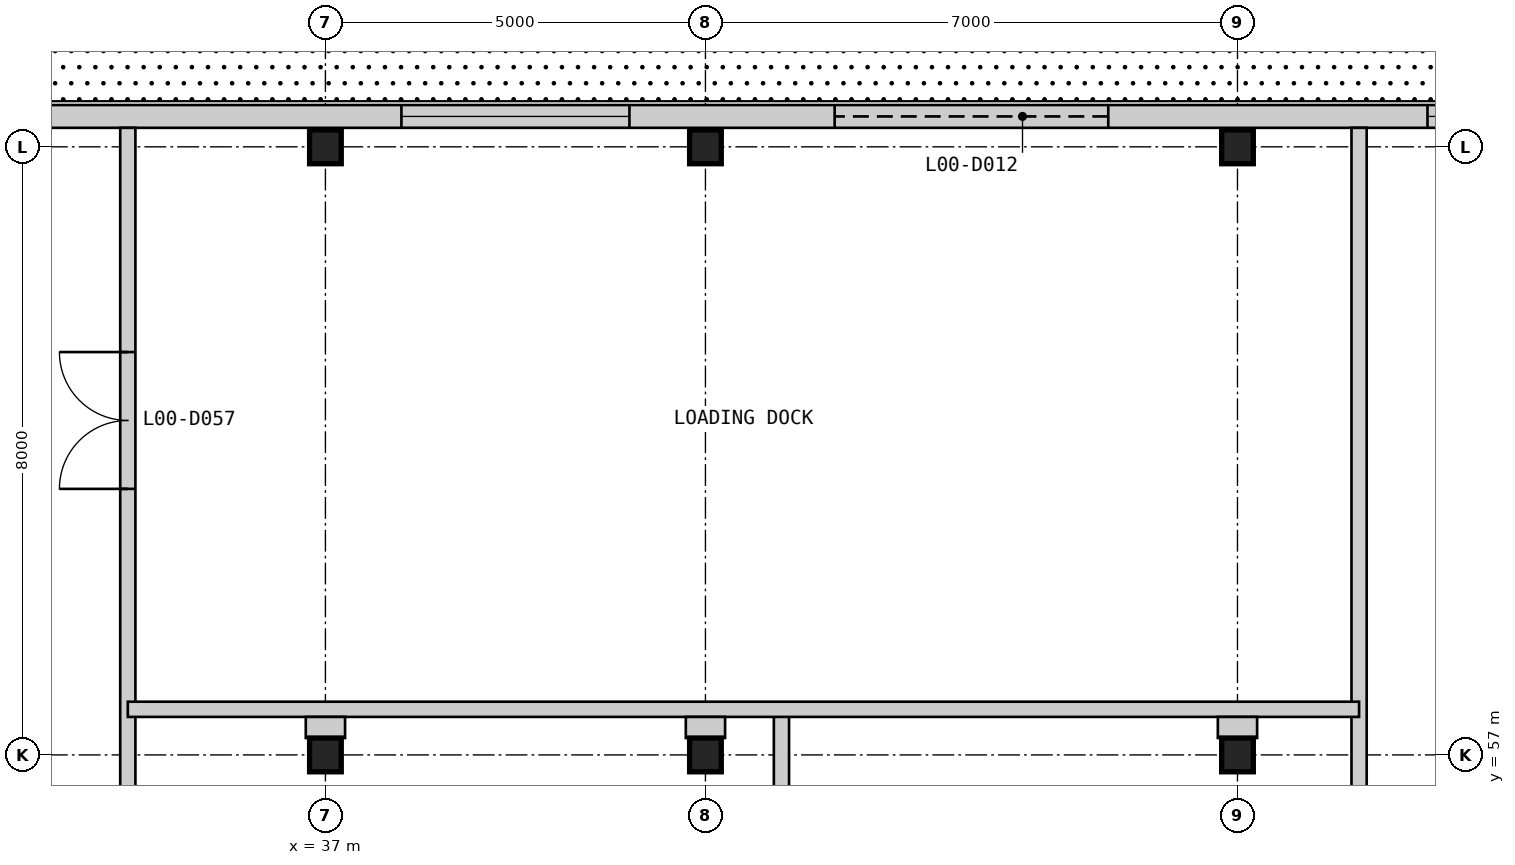
"""IFC4 building model, lengths in metres.
Left out: names, types, materials, properties, quantities, classifications, styles, units other than length and angle.
Written with IfcOpenShell. Run it as: python <this file> out.ifc"""

import sys

from ifc_helpers import new_model, si_unit, direction, frame, frame_2d, origin, origin_2d, place, context, subcontext, project, spatial, rectangle, i_section, extrude, element, fill, save


model = new_model("IFC4")
c1 = context("Model", 3, precision=1e-05, world=origin(), true_north=direction((0.0, 1.0)))
c2 = subcontext(c1, "Body", "Model", "MODEL_VIEW")
j1 = project(units=[si_unit("LENGTHUNIT", "METRE"), si_unit("PLANEANGLEUNIT", "RADIAN")], contexts=[c1])
p1 = place(None, origin())
s1 = spatial("IfcSite", under=j1, at=p1, CompositionType="ELEMENT")
p2 = place(p1, origin())
s2 = spatial("IfcBuilding", under=s1, at=p2, CompositionType="ELEMENT")
p3 = place(p2, origin())
s3 = spatial("IfcBuildingStorey", under=s2, at=p3, CompositionType="ELEMENT", Elevation=0.0)
p4 = place(p3, frame((37.0, 57.0, 0.0), z_axis=(0.0, 0.0, 1.0), x_axis=(1.0, 0.0, 0.0)))
e1 = element("IfcColumn", 1, at=p4, inside=s3, PredefinedType="COLUMN", context=c2, shape_type="SweptSolid", body=[
    extrude(i_section(OverallWidth=0.417, OverallDepth=0.445, WebThickness=0.039, FlangeThickness=0.063, at=origin_2d()), origin(), (0.0, 0.0, 1.0), 7.0),
])
p5 = place(p3, frame((37.0, 65.0, -0.3), z_axis=(0.0, 0.0, 1.0), x_axis=(1.0, 0.0, 0.0)))
e2 = element("IfcColumn", 2, at=p5, inside=s3, PredefinedType="COLUMN", context=c2, shape_type="SweptSolid", body=[
    extrude(i_section(OverallWidth=0.417, OverallDepth=0.445, WebThickness=0.039, FlangeThickness=0.063, at=origin_2d()), origin(), (0.0, 0.0, 1.0), 7.3),
])
p6 = place(p3, frame((42.0, 57.0, 0.0), z_axis=(0.0, 0.0, 1.0), x_axis=(1.0, 0.0, 0.0)))
e3 = element("IfcColumn", 3, at=p6, inside=s3, PredefinedType="COLUMN", context=c2, shape_type="SweptSolid", body=[
    extrude(i_section(OverallWidth=0.417, OverallDepth=0.445, WebThickness=0.039, FlangeThickness=0.063, at=origin_2d()), origin(), (0.0, 0.0, 1.0), 7.0),
])
p7 = place(p3, frame((42.0, 65.0, -0.3), z_axis=(0.0, 0.0, 1.0), x_axis=(1.0, 0.0, 0.0)))
e4 = element("IfcColumn", 4, at=p7, inside=s3, PredefinedType="COLUMN", context=c2, shape_type="SweptSolid", body=[
    extrude(i_section(OverallWidth=0.417, OverallDepth=0.445, WebThickness=0.039, FlangeThickness=0.063, at=origin_2d()), origin(), (0.0, 0.0, 1.0), 7.3),
])
p8 = place(p3, frame((49.0, 57.0, 0.0), z_axis=(0.0, 0.0, 1.0), x_axis=(1.0, 0.0, 0.0)))
e5 = element("IfcColumn", 5, at=p8, inside=s3, PredefinedType="COLUMN", context=c2, shape_type="SweptSolid", body=[
    extrude(i_section(OverallWidth=0.417, OverallDepth=0.445, WebThickness=0.039, FlangeThickness=0.063, at=origin_2d()), origin(), (0.0, 0.0, 1.0), 7.0),
])
p9 = place(p3, frame((49.0, 65.0, -0.3), z_axis=(0.0, 0.0, 1.0), x_axis=(1.0, 0.0, 0.0)))
e6 = element("IfcColumn", 6, at=p9, inside=s3, PredefinedType="COLUMN", context=c2, shape_type="SweptSolid", body=[
    extrude(i_section(OverallWidth=0.417, OverallDepth=0.445, WebThickness=0.039, FlangeThickness=0.063, at=origin_2d()), origin(), (0.0, 0.0, 1.0), 7.3),
])
p10 = place(p3, frame((65.55, 65.4, 0.0), z_axis=(0.0, 0.0, 1.0), x_axis=(-1.0, 0.0, 0.0)))
e7 = element("IfcWall", 7, at=p10, inside=s3, PredefinedType="SOLIDWALL", context=c2, shape_type="SweptSolid", body=[
    extrude(rectangle(XDim=81.1, YDim=0.3, at=frame_2d((40.55, 0.0))), origin(), (0.0, 0.0, 1.0), 6.7),
])
p11 = place(p10, frame((37.65, 0.0, 0.0)))
e8 = element("IfcOpeningElement", 8, at=p11, cuts=e7, PredefinedType="OPENING", context=c2, shape_type="SweptSolid", body=[
    extrude(rectangle(XDim=1.8, YDim=2.4, at=frame_2d((0.9, 1.2))), frame((0.0, 0.16, 0.0), z_axis=(0.0, -1.0, 0.0), x_axis=(1.0, 0.0, 0.0)), (0.0, 0.0, 1.0), 0.32),
])
p12 = place(p10, frame((33.65, 0.0, 0.0)))
e9 = element("IfcOpeningElement", 9, at=p12, cuts=e7, PredefinedType="OPENING", context=c2, shape_type="SweptSolid", body=[
    extrude(rectangle(XDim=1.8, YDim=2.4, at=frame_2d((0.9, 1.2))), frame((0.0, 0.16, 0.0), z_axis=(0.0, -1.0, 0.0), x_axis=(1.0, 0.0, 0.0)), (0.0, 0.0, 1.0), 0.32),
])
p13 = place(p10, frame((18.25, 0.0, 0.0)))
e10 = element("IfcOpeningElement", 10, at=p13, cuts=e7, PredefinedType="OPENING", context=c2, shape_type="SweptSolid", body=[
    extrude(rectangle(XDim=3.6, YDim=4.5, at=frame_2d((1.8, 2.25))), frame((0.0, 0.16, 0.0), z_axis=(0.0, -1.0, 0.0), x_axis=(1.0, 0.0, 0.0)), (0.0, 0.0, 1.0), 0.32),
])
p14 = place(p10, frame((75.05, 0.0, 0.9)))
e11 = element("IfcOpeningElement", 11, at=p14, cuts=e7, PredefinedType="OPENING", context=c2, shape_type="SweptSolid", body=[
    extrude(rectangle(XDim=3.0, YDim=2.4, at=frame_2d((1.5, 1.2))), frame((0.0, 0.16, 0.0), z_axis=(0.0, -1.0, 0.0), x_axis=(1.0, 0.0, 0.0)), (0.0, 0.0, 1.0), 0.32),
])
p15 = place(p10, frame((67.05, 0.0, 0.9)))
e12 = element("IfcOpeningElement", 12, at=p15, cuts=e7, PredefinedType="OPENING", context=c2, shape_type="SweptSolid", body=[
    extrude(rectangle(XDim=3.0, YDim=2.4, at=frame_2d((1.5, 1.2))), frame((0.0, 0.16, 0.0), z_axis=(0.0, -1.0, 0.0), x_axis=(1.0, 0.0, 0.0)), (0.0, 0.0, 1.0), 0.32),
])
p16 = place(p10, frame((59.05, 0.0, 0.9)))
e13 = element("IfcOpeningElement", 13, at=p16, cuts=e7, PredefinedType="OPENING", context=c2, shape_type="SweptSolid", body=[
    extrude(rectangle(XDim=3.0, YDim=2.4, at=frame_2d((1.5, 1.2))), frame((0.0, 0.16, 0.0), z_axis=(0.0, -1.0, 0.0), x_axis=(1.0, 0.0, 0.0)), (0.0, 0.0, 1.0), 0.32),
])
p17 = place(p10, frame((45.05, 0.0, 0.9)))
e14 = element("IfcOpeningElement", 14, at=p17, cuts=e7, PredefinedType="OPENING", context=c2, shape_type="SweptSolid", body=[
    extrude(rectangle(XDim=3.0, YDim=2.4, at=frame_2d((1.5, 1.2))), frame((0.0, 0.16, 0.0), z_axis=(0.0, -1.0, 0.0), x_axis=(1.0, 0.0, 0.0)), (0.0, 0.0, 1.0), 0.32),
])
p18 = place(p10, frame((24.55, 0.0, 0.9)))
e15 = element("IfcOpeningElement", 15, at=p18, cuts=e7, PredefinedType="OPENING", context=c2, shape_type="SweptSolid", body=[
    extrude(rectangle(XDim=3.0, YDim=2.4, at=frame_2d((1.5, 1.2))), frame((0.0, 0.16, 0.0), z_axis=(0.0, -1.0, 0.0), x_axis=(1.0, 0.0, 0.0)), (0.0, 0.0, 1.0), 0.32),
])
p19 = place(p10, frame((11.05, 0.0, 0.9)))
e16 = element("IfcOpeningElement", 16, at=p19, cuts=e7, PredefinedType="OPENING", context=c2, shape_type="SweptSolid", body=[
    extrude(rectangle(XDim=3.0, YDim=2.4, at=frame_2d((1.5, 1.2))), frame((0.0, 0.16, 0.0), z_axis=(0.0, -1.0, 0.0), x_axis=(1.0, 0.0, 0.0)), (0.0, 0.0, 1.0), 0.32),
])
p20 = place(p10, frame((3.05, 0.0, 0.9)))
e17 = element("IfcOpeningElement", 17, at=p20, cuts=e7, PredefinedType="OPENING", context=c2, shape_type="SweptSolid", body=[
    extrude(rectangle(XDim=3.0, YDim=2.4, at=frame_2d((1.5, 1.2))), frame((0.0, 0.16, 0.0), z_axis=(0.0, -1.0, 0.0), x_axis=(1.0, 0.0, 0.0)), (0.0, 0.0, 1.0), 0.32),
])
p21 = place(p3, frame((34.4, 43.0, 0.0), z_axis=(0.0, 0.0, 1.0), x_axis=(0.0, 1.0, 0.0)))
e18 = element("IfcWall", 18, at=p21, inside=s3, PredefinedType="PARTITIONING", context=c2, shape_type="SweptSolid", body=[
    extrude(rectangle(XDim=22.25, YDim=0.2, at=frame_2d((11.125, 0.0))), origin(), (0.0, 0.0, 1.0), 6.7),
])
p22 = place(p21, frame((6.425, 0.0, 0.0)))
e19 = element("IfcOpeningElement", 19, at=p22, cuts=e18, PredefinedType="OPENING", context=c2, shape_type="SweptSolid", body=[
    extrude(rectangle(XDim=1.8, YDim=2.4, at=frame_2d((0.9, 1.2))), frame((0.0, 0.11, 0.0), z_axis=(0.0, -1.0, 0.0), x_axis=(1.0, 0.0, 0.0)), (0.0, 0.0, 1.0), 0.22),
])
p23 = place(p21, frame((17.5, 0.0, 0.0)))
e20 = element("IfcOpeningElement", 20, at=p23, cuts=e18, PredefinedType="OPENING", context=c2, shape_type="SweptSolid", body=[
    extrude(rectangle(XDim=1.8, YDim=2.4, at=frame_2d((0.9, 1.2))), frame((0.0, 0.11, 0.0), z_axis=(0.0, -1.0, 0.0), x_axis=(1.0, 0.0, 0.0)), (0.0, 0.0, 1.0), 0.22),
])
p24 = place(p3, frame((43.0, 37.0, 0.0), z_axis=(0.0, 0.0, 1.0), x_axis=(0.0, 1.0, 0.0)))
e21 = element("IfcWall", 21, at=p24, inside=s3, PredefinedType="PARTITIONING", context=c2, shape_type="SweptSolid", body=[
    extrude(rectangle(XDim=20.6, YDim=0.2, at=frame_2d((10.3, 0.0))), origin(), (0.0, 0.0, 1.0), 6.7),
])
p25 = place(p3, frame((50.6, 38.4, 0.0), z_axis=(0.0, 0.0, 1.0), x_axis=(0.0, 1.0, 0.0)))
e22 = element("IfcWall", 22, at=p25, inside=s3, PredefinedType="PARTITIONING", context=c2, shape_type="SweptSolid", body=[
    extrude(rectangle(XDim=26.85, YDim=0.2, at=frame_2d((13.425, 0.0))), origin(), (0.0, 0.0, 1.0), 6.7),
])
p26 = place(p3, frame((34.4, 57.6, 0.0), z_axis=(0.0, 0.0, 1.0), x_axis=(1.0, 0.0, 0.0)))
e23 = element("IfcWall", 23, at=p26, inside=s3, PredefinedType="PARTITIONING", context=c2, shape_type="SweptSolid", body=[
    extrude(rectangle(XDim=16.2, YDim=0.2, at=frame_2d((8.1, 0.0))), origin(), (0.0, 0.0, 1.0), 6.7),
])
for number, where, z_axis, x_axis in (
    (24, (49.0, 57.5, 0.0), (0.0, 0.0, 1.0), (0.0, -1.0, 0.0)),
    (25, (37.0, 57.5, 0.0), (0.0, 0.0, 1.0), (0.0, -1.0, 0.0)),
    (26, (42.0, 57.5, 0.0), (0.0, 0.0, 1.0), (0.0, -1.0, 0.0)),
):
    element("IfcWall", number, at=place(p3, frame(where, z_axis=z_axis, x_axis=x_axis)), inside=s3, PredefinedType="PARTITIONING", context=c2, shape_type="SweptSolid", body=[
        extrude(rectangle(XDim=0.278, YDim=0.517, at=frame_2d((0.139, 0.0))), origin(), (0.0, 0.0, 1.0), 6.7),
    ])
p27 = place(p13, origin())
e27 = element("IfcDoor", 27, at=p27, inside=s3, OperationType="ROLLINGUP", PredefinedType="DOOR", context=c2, shape_type="SweptSolid", body=[
    extrude(rectangle(XDim=3.6, YDim=4.5, at=frame_2d((1.8, 2.25))), frame((0.0, 0.025, 0.0), z_axis=(0.0, -1.0, 0.0), x_axis=(1.0, 0.0, 0.0)), (0.0, 0.0, 1.0), 0.05),
])
fill(e10, e27)
p28 = place(p18, origin())
e28 = element("IfcWindow", 28, at=p28, inside=s3, PartitioningType="SINGLE_PANEL", PredefinedType="WINDOW", context=c2, shape_type="SweptSolid", body=[
    extrude(rectangle(XDim=3.0, YDim=2.4, at=frame_2d((1.5, 1.2))), frame((0.0, 0.03, 0.0), z_axis=(0.0, -1.0, 0.0), x_axis=(1.0, 0.0, 0.0)), (0.0, 0.0, 1.0), 0.06),
])
fill(e15, e28)
p29 = place(p19, origin())
e29 = element("IfcWindow", 29, at=p29, inside=s3, PartitioningType="SINGLE_PANEL", PredefinedType="WINDOW", context=c2, shape_type="SweptSolid", body=[
    extrude(rectangle(XDim=3.0, YDim=2.4, at=frame_2d((1.5, 1.2))), frame((0.0, 0.03, 0.0), z_axis=(0.0, -1.0, 0.0), x_axis=(1.0, 0.0, 0.0)), (0.0, 0.0, 1.0), 0.06),
])
fill(e16, e29)
p30 = place(p23, origin())
e30 = element("IfcDoor", 30, at=p30, inside=s3, OperationType="DOUBLE_DOOR_SINGLE_SWING", PredefinedType="DOOR", context=c2, shape_type="SweptSolid", body=[
    extrude(rectangle(XDim=1.8, YDim=2.4, at=frame_2d((0.9, 1.2))), frame((0.0, 0.025, 0.0), z_axis=(0.0, -1.0, 0.0), x_axis=(1.0, 0.0, 0.0)), (0.0, 0.0, 1.0), 0.05),
])
fill(e20, e30)
save(model, sys.argv[1])
